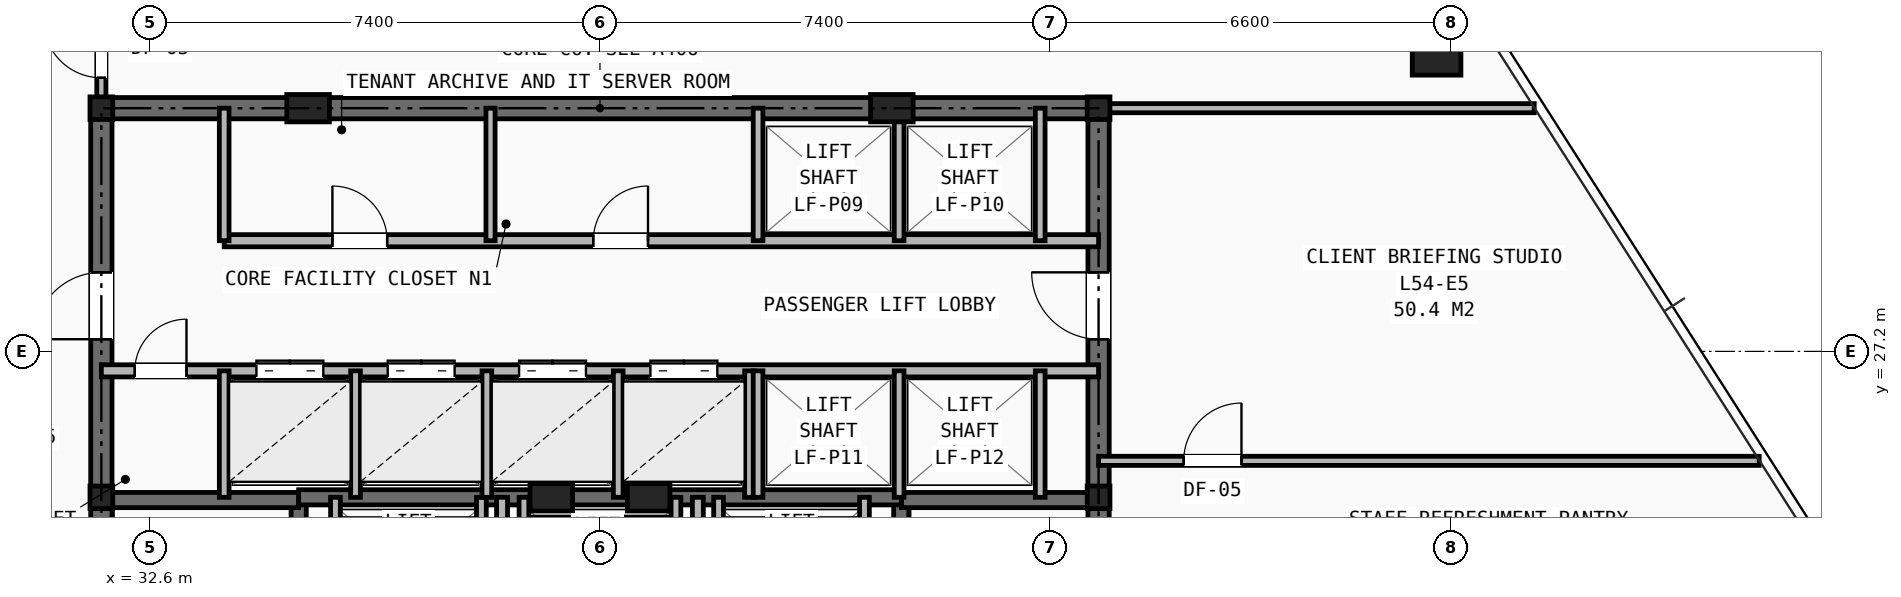
"""IFC4 building model, lengths in metres.
Left out: names, types, materials, properties, quantities, classifications, styles, units other than length and angle.
Written with IfcOpenShell. Run it as: python <this file> out.ifc"""

import sys

from ifc_helpers import new_model, si_unit, direction, frame, frame_2d, origin, origin_2d, place, context, subcontext, project, spatial, rectangle, hollow_rectangle, i_section, extrude, element, fill, save


model = new_model("IFC4")
c1 = context("Model", 3, precision=1e-05, world=origin(), true_north=direction((0.0, 1.0)))
c2 = subcontext(c1, "Body", "Model", "MODEL_VIEW")
j1 = project(units=[si_unit("LENGTHUNIT", "METRE"), si_unit("PLANEANGLEUNIT", "RADIAN")], contexts=[c1])
p1 = place(None, origin())
s1 = spatial("IfcSite", under=j1, at=p1, CompositionType="ELEMENT")
p2 = place(p1, origin())
s2 = spatial("IfcBuilding", under=s1, at=p2, CompositionType="ELEMENT")
p3 = place(p2, frame((0.0, 0.0, 189.6)))
s3 = spatial("IfcBuildingStorey", under=s2, at=p3, CompositionType="ELEMENT", Elevation=189.6)
for number, where, z_axis, x_axis in (
    (1, (31.8, 24.8, 0.0), (0.0, 0.0, 1.0), (1.0, 0.0, 0.0)),
    (2, (48.2, 24.8, 0.0), (0.0, 0.0, 1.0), (1.0, 0.0, 0.0)),
    (3, (31.8, 31.2, 0.0), (0.0, 0.0, 1.0), (1.0, 0.0, 0.0)),
    (4, (48.2, 31.2, 0.0), (0.0, 0.0, 1.0), (1.0, 0.0, 0.0)),
):
    element("IfcColumn", number, at=place(p3, frame(where, z_axis=z_axis, x_axis=x_axis)), inside=s3, PredefinedType="COLUMN", context=c2, shape_type="SweptSolid", body=[
        extrude(i_section(OverallWidth=0.374, OverallDepth=0.372, WebThickness=0.016, FlangeThickness=0.026, at=origin_2d()), origin(), (0.0, 0.0, 1.0), 3.45),
    ])
for number, where, z_axis, x_axis in (
    (5, (35.2, 31.2, 0.0), (0.0, 0.0, 1.0), (1.0, 0.0, 0.0)),
    (6, (44.8, 31.2, 0.0), (0.0, 0.0, 1.0), (1.0, 0.0, 0.0)),
    (7, (39.2, 24.8, 0.0), (0.0, 0.0, 1.0), (1.0, 0.0, 0.0)),
    (8, (40.8, 24.8, 0.0), (0.0, 0.0, 1.0), (1.0, 0.0, 0.0)),
):
    element("IfcColumn", number, at=place(p3, frame(where, z_axis=z_axis, x_axis=x_axis)), inside=s3, PredefinedType="PILASTER", context=c2, shape_type="SweptSolid", body=[
        extrude(rectangle(XDim=0.7, YDim=0.45, at=origin_2d()), origin(), (0.0, 0.0, 1.0), 3.45),
    ])
p4 = place(p3, frame((53.759, 32.144, 0.0), z_axis=(0.0, 0.0, 1.0), x_axis=(1.0, 0.0, 0.0)))
e9 = element("IfcColumn", 9, at=p4, inside=s3, PredefinedType="COLUMN", context=c2, shape_type="SweptSolid", body=[
    extrude(hollow_rectangle(XDim=0.8, YDim=0.8, WallThickness=0.055, at=origin_2d()), origin(), (0.0, 0.0, 1.0), 3.45),
])
p5 = place(p3, frame((31.8, 31.2, 0.0), z_axis=(0.0, 0.0, 1.0), x_axis=(1.0, 0.0, 0.0)))
e10 = element("IfcWall", 10, at=p5, inside=s3, PredefinedType="SHEAR", context=c2, shape_type="SweptSolid", body=[
    extrude(rectangle(XDim=16.4, YDim=0.35, at=frame_2d((8.2, 0.0))), origin(), (0.0, 0.0, 1.0), 3.21),
])
p6 = place(p3, frame((31.8, 16.4, 0.0), z_axis=(0.0, 0.0, 1.0), x_axis=(0.0, 1.0, 0.0)))
e11 = element("IfcWall", 11, at=p6, inside=s3, PredefinedType="SHEAR", context=c2, shape_type="SweptSolid", body=[
    extrude(rectangle(XDim=14.8, YDim=0.35, at=frame_2d((7.4, 0.0))), origin(), (0.0, 0.0, 1.0), 3.21),
])
p7 = place(p6, frame((11.0, 0.0, 0.0)))
e12 = element("IfcOpeningElement", 12, at=p7, cuts=e11, PredefinedType="OPENING", context=c2, shape_type="SweptSolid", body=[
    extrude(rectangle(XDim=1.1, YDim=2.15, at=frame_2d((0.55, 1.075))), frame((0.0, 0.185, 0.0), z_axis=(0.0, -1.0, 0.0), x_axis=(1.0, 0.0, 0.0)), (0.0, 0.0, 1.0), 0.37),
])
p8 = place(p3, frame((48.2, 16.4, 0.0), z_axis=(0.0, 0.0, 1.0), x_axis=(0.0, 1.0, 0.0)))
e13 = element("IfcWall", 13, at=p8, inside=s3, PredefinedType="SHEAR", context=c2, shape_type="SweptSolid", body=[
    extrude(rectangle(XDim=14.8, YDim=0.35, at=frame_2d((7.4, 0.0))), origin(), (0.0, 0.0, 1.0), 3.21),
])
p9 = place(p8, frame((11.0, 0.0, 0.0)))
e14 = element("IfcOpeningElement", 14, at=p9, cuts=e13, PredefinedType="OPENING", context=c2, shape_type="SweptSolid", body=[
    extrude(rectangle(XDim=1.1, YDim=2.15, at=frame_2d((0.55, 1.075))), frame((0.0, 0.185, 0.0), z_axis=(0.0, -1.0, 0.0), x_axis=(1.0, 0.0, 0.0)), (0.0, 0.0, 1.0), 0.37),
])
p10 = place(p3, frame((35.045, 16.4, 0.0), z_axis=(0.0, 0.0, 1.0), x_axis=(0.0, 1.0, 0.0)))
e15 = element("IfcWall", 15, at=p10, inside=s3, PredefinedType="SHEAR", context=c2, shape_type="SweptSolid", body=[
    extrude(rectangle(XDim=8.4, YDim=0.25, at=frame_2d((4.2, 0.0))), origin(), (0.0, 0.0, 1.0), 3.21),
])
p11 = place(p10, frame((0.45, 0.0, 0.0)))
e16 = element("IfcOpeningElement", 16, at=p11, cuts=e15, PredefinedType="OPENING", context=c2, shape_type="SweptSolid", body=[
    extrude(rectangle(XDim=0.95, YDim=2.1, at=frame_2d((0.475, 1.05))), frame((0.0, 0.135, 0.0), z_axis=(0.0, -1.0, 0.0), x_axis=(1.0, 0.0, 0.0)), (0.0, 0.0, 1.0), 0.27),
])
p12 = place(p3, frame((31.8, 24.755, 0.0), z_axis=(0.0, 0.0, 1.0), x_axis=(1.0, 0.0, 0.0)))
e17 = element("IfcWall", 17, at=p12, inside=s3, PredefinedType="SHEAR", context=c2, shape_type="SweptSolid", body=[
    extrude(rectangle(XDim=3.245, YDim=0.25, at=frame_2d((1.623, 0.0))), origin(), (0.0, 0.0, 1.0), 3.21),
])
p13 = place(p3, frame((44.955, 16.4, 0.0), z_axis=(0.0, 0.0, 1.0), x_axis=(0.0, 1.0, 0.0)))
e18 = element("IfcWall", 18, at=p13, inside=s3, PredefinedType="SHEAR", context=c2, shape_type="SweptSolid", body=[
    extrude(rectangle(XDim=8.4, YDim=0.25, at=frame_2d((4.2, 0.0))), origin(), (0.0, 0.0, 1.0), 3.21),
])
p14 = place(p13, frame((0.45, 0.0, 0.0)))
e19 = element("IfcOpeningElement", 19, at=p14, cuts=e18, PredefinedType="OPENING", context=c2, shape_type="SweptSolid", body=[
    extrude(rectangle(XDim=0.95, YDim=2.1, at=frame_2d((0.475, 1.05))), frame((0.0, 0.135, 0.0), z_axis=(0.0, -1.0, 0.0), x_axis=(1.0, 0.0, 0.0)), (0.0, 0.0, 1.0), 0.27),
])
p15 = place(p3, frame((44.955, 24.755, 0.0), z_axis=(0.0, 0.0, 1.0), x_axis=(1.0, 0.0, 0.0)))
e20 = element("IfcWall", 20, at=p15, inside=s3, PredefinedType="SHEAR", context=c2, shape_type="SweptSolid", body=[
    extrude(rectangle(XDim=3.245, YDim=0.25, at=frame_2d((1.623, 0.0))), origin(), (0.0, 0.0, 1.0), 3.21),
])
p16 = place(p3, frame((35.045, 24.8, 0.0), z_axis=(0.0, 0.0, 1.0), x_axis=(1.0, 0.0, 0.0)))
e21 = element("IfcWall", 21, at=p16, inside=s3, PredefinedType="SHEAR", context=c2, shape_type="SweptSolid", body=[
    extrude(rectangle(XDim=9.91, YDim=0.25, at=frame_2d((4.955, 0.0))), origin(), (0.0, 0.0, 1.0), 3.21),
])
p17 = place(p3, frame((38.39, 16.4, 0.0), z_axis=(0.0, 0.0, 1.0), x_axis=(0.0, 1.0, 0.0)))
e22 = element("IfcWall", 22, at=p17, inside=s3, PredefinedType="PARTITIONING", context=c2, shape_type="SweptSolid", body=[
    extrude(rectangle(XDim=8.4, YDim=0.18, at=frame_2d((4.2, 0.0))), origin(), (0.0, 0.0, 1.0), 2.665),
])
p18 = place(p17, frame((3.85, 0.0, 0.0)))
e23 = element("IfcOpeningElement", 23, at=p18, cuts=e22, PredefinedType="OPENING", context=c2, shape_type="SweptSolid", body=[
    extrude(rectangle(XDim=0.95, YDim=2.1, at=frame_2d((0.475, 1.05))), frame((0.0, 0.1, 0.0), z_axis=(0.0, -1.0, 0.0), x_axis=(1.0, 0.0, 0.0)), (0.0, 0.0, 1.0), 0.2),
])
p19 = place(p3, frame((41.61, 16.4, 0.0), z_axis=(0.0, 0.0, 1.0), x_axis=(0.0, 1.0, 0.0)))
e24 = element("IfcWall", 24, at=p19, inside=s3, PredefinedType="PARTITIONING", context=c2, shape_type="SweptSolid", body=[
    extrude(rectangle(XDim=8.4, YDim=0.18, at=frame_2d((4.2, 0.0))), origin(), (0.0, 0.0, 1.0), 2.665),
])
for number, where, z_axis, x_axis in (
    (25, (35.65, 22.48, 0.0), (0.0, 0.0, 1.0), (0.0, 1.0, 0.0)),
    (26, (38.05, 22.48, 0.0), (0.0, 0.0, 1.0), (0.0, 1.0, 0.0)),
    (27, (41.95, 22.48, 0.0), (0.0, 0.0, 1.0), (0.0, 1.0, 0.0)),
    (28, (44.35, 22.48, 0.0), (0.0, 0.0, 1.0), (0.0, 1.0, 0.0)),
    (29, (38.75, 22.48, 0.0), (0.0, 0.0, 1.0), (0.0, 1.0, 0.0)),
    (30, (41.25, 22.48, 0.0), (0.0, 0.0, 1.0), (0.0, 1.0, 0.0)),
):
    element("IfcWall", number, at=place(p3, frame(where, z_axis=z_axis, x_axis=x_axis)), inside=s3, PredefinedType="SOLIDWALL", context=c2, shape_type="SweptSolid", body=[
        extrude(rectangle(XDim=2.32, YDim=0.16, at=frame_2d((1.16, 0.0))), origin(), (0.0, 0.0, 1.0), 3.21),
    ])
p20 = place(p3, frame((33.82, 29.02, 0.0), z_axis=(0.0, 0.0, 1.0), x_axis=(1.0, 0.0, 0.0)))
e31 = element("IfcWall", 31, at=p20, inside=s3, PredefinedType="SOLIDWALL", context=c2, shape_type="SweptSolid", body=[
    extrude(rectangle(XDim=14.38, YDim=0.2, at=frame_2d((7.19, 0.0))), origin(), (0.0, 0.0, 1.0), 2.665),
])
p21 = place(p20, frame((1.78, 0.0, 0.0)))
e32 = element("IfcOpeningElement", 32, at=p21, cuts=e31, PredefinedType="OPENING", context=c2, shape_type="SweptSolid", body=[
    extrude(rectangle(XDim=0.9, YDim=2.1, at=frame_2d((0.45, 1.05))), frame((0.0, 0.11, 0.0), z_axis=(0.0, -1.0, 0.0), x_axis=(1.0, 0.0, 0.0)), (0.0, 0.0, 1.0), 0.22),
])
p22 = place(p20, frame((6.07, 0.0, 0.0)))
e33 = element("IfcOpeningElement", 33, at=p22, cuts=e31, PredefinedType="OPENING", context=c2, shape_type="SweptSolid", body=[
    extrude(rectangle(XDim=0.9, YDim=2.1, at=frame_2d((0.45, 1.05))), frame((0.0, 0.11, 0.0), z_axis=(0.0, -1.0, 0.0), x_axis=(1.0, 0.0, 0.0)), (0.0, 0.0, 1.0), 0.22),
])
p23 = place(p3, frame((31.8, 26.88, 0.0), z_axis=(0.0, 0.0, 1.0), x_axis=(1.0, 0.0, 0.0)))
e34 = element("IfcWall", 34, at=p23, inside=s3, PredefinedType="SOLIDWALL", context=c2, shape_type="SweptSolid", body=[
    extrude(rectangle(XDim=16.4, YDim=0.2, at=frame_2d((8.2, 0.0))), origin(), (0.0, 0.0, 1.0), 2.665),
])
p24 = place(p23, frame((0.55, 0.0, 0.0)))
e35 = element("IfcOpeningElement", 35, at=p24, cuts=e34, PredefinedType="OPENING", context=c2, shape_type="SweptSolid", body=[
    extrude(rectangle(XDim=0.85, YDim=2.05, at=frame_2d((0.425, 1.025))), frame((0.0, 0.11, 0.0), z_axis=(0.0, -1.0, 0.0), x_axis=(1.0, 0.0, 0.0)), (0.0, 0.0, 1.0), 0.22),
])
p25 = place(p23, frame((2.55, 0.0, 0.0)))
e36 = element("IfcOpeningElement", 36, at=p25, cuts=e34, PredefinedType="OPENING", context=c2, shape_type="SweptSolid", body=[
    extrude(rectangle(XDim=1.1, YDim=2.15, at=frame_2d((0.55, 1.075))), frame((0.0, 0.11, 0.0), z_axis=(0.0, -1.0, 0.0), x_axis=(1.0, 0.0, 0.0)), (0.0, 0.0, 1.0), 0.22),
])
p26 = place(p23, frame((4.71, 0.0, 0.0)))
e37 = element("IfcOpeningElement", 37, at=p26, cuts=e34, PredefinedType="OPENING", context=c2, shape_type="SweptSolid", body=[
    extrude(rectangle(XDim=1.1, YDim=2.15, at=frame_2d((0.55, 1.075))), frame((0.0, 0.11, 0.0), z_axis=(0.0, -1.0, 0.0), x_axis=(1.0, 0.0, 0.0)), (0.0, 0.0, 1.0), 0.22),
])
p27 = place(p23, frame((6.87, 0.0, 0.0)))
e38 = element("IfcOpeningElement", 38, at=p27, cuts=e34, PredefinedType="OPENING", context=c2, shape_type="SweptSolid", body=[
    extrude(rectangle(XDim=1.1, YDim=2.15, at=frame_2d((0.55, 1.075))), frame((0.0, 0.11, 0.0), z_axis=(0.0, -1.0, 0.0), x_axis=(1.0, 0.0, 0.0)), (0.0, 0.0, 1.0), 0.22),
])
p28 = place(p23, frame((9.03, 0.0, 0.0)))
e39 = element("IfcOpeningElement", 39, at=p28, cuts=e34, PredefinedType="OPENING", context=c2, shape_type="SweptSolid", body=[
    extrude(rectangle(XDim=1.1, YDim=2.15, at=frame_2d((0.55, 1.075))), frame((0.0, 0.11, 0.0), z_axis=(0.0, -1.0, 0.0), x_axis=(1.0, 0.0, 0.0)), (0.0, 0.0, 1.0), 0.22),
])
p29 = place(p3, frame((33.82, 29.02, 0.0), z_axis=(0.0, 0.0, 1.0), x_axis=(0.0, 1.0, 0.0)))
e40 = element("IfcWall", 40, at=p29, inside=s3, PredefinedType="SOLIDWALL", context=c2, shape_type="SweptSolid", body=[
    extrude(rectangle(XDim=2.18, YDim=0.16, at=frame_2d((1.09, 0.0))), origin(), (0.0, 0.0, 1.0), 2.665),
])
p30 = place(p3, frame((33.82, 24.8, 0.0), z_axis=(0.0, 0.0, 1.0), x_axis=(0.0, 1.0, 0.0)))
e41 = element("IfcWall", 41, at=p30, inside=s3, PredefinedType="SOLIDWALL", context=c2, shape_type="SweptSolid", body=[
    extrude(rectangle(XDim=2.08, YDim=0.16, at=frame_2d((1.04, 0.0))), origin(), (0.0, 0.0, 1.0), 3.21),
])
p31 = place(p3, frame((38.2, 29.02, 0.0), z_axis=(0.0, 0.0, 1.0), x_axis=(0.0, 1.0, 0.0)))
e42 = element("IfcWall", 42, at=p31, inside=s3, PredefinedType="PARTITIONING", context=c2, shape_type="SweptSolid", body=[
    extrude(rectangle(XDim=2.18, YDim=0.15, at=frame_2d((1.09, 0.0))), origin(), (0.0, 0.0, 1.0), 2.665),
])
for number, where, z_axis, x_axis in (
    (43, (35.98, 24.8, 0.0), (0.0, 0.0, 1.0), (0.0, 1.0, 0.0)),
    (44, (38.14, 24.8, 0.0), (0.0, 0.0, 1.0), (0.0, 1.0, 0.0)),
    (45, (40.3, 24.8, 0.0), (0.0, 0.0, 1.0), (0.0, 1.0, 0.0)),
    (46, (42.46, 24.8, 0.0), (0.0, 0.0, 1.0), (0.0, 1.0, 0.0)),
):
    element("IfcWall", number, at=place(p3, frame(where, z_axis=z_axis, x_axis=x_axis)), inside=s3, PredefinedType="SOLIDWALL", context=c2, shape_type="SweptSolid", body=[
        extrude(rectangle(XDim=2.08, YDim=0.16, at=frame_2d((1.04, 0.0))), origin(), (0.0, 0.0, 1.0), 3.21),
    ])
for number, where, z_axis, x_axis in (
    (47, (42.6, 29.02, 0.0), (0.0, 0.0, 1.0), (0.0, 1.0, 0.0)),
    (48, (44.92, 29.02, 0.0), (0.0, 0.0, 1.0), (0.0, 1.0, 0.0)),
    (49, (47.24, 29.02, 0.0), (0.0, 0.0, 1.0), (0.0, 1.0, 0.0)),
):
    element("IfcWall", number, at=place(p3, frame(where, z_axis=z_axis, x_axis=x_axis)), inside=s3, PredefinedType="SOLIDWALL", context=c2, shape_type="SweptSolid", body=[
        extrude(rectangle(XDim=2.18, YDim=0.16, at=frame_2d((1.09, 0.0))), origin(), (0.0, 0.0, 1.0), 2.665),
    ])
for number, where, z_axis, x_axis in (
    (50, (42.6, 24.8, 0.0), (0.0, 0.0, 1.0), (0.0, 1.0, 0.0)),
    (51, (44.92, 24.8, 0.0), (0.0, 0.0, 1.0), (0.0, 1.0, 0.0)),
    (52, (47.24, 24.8, 0.0), (0.0, 0.0, 1.0), (0.0, 1.0, 0.0)),
):
    element("IfcWall", number, at=place(p3, frame(where, z_axis=z_axis, x_axis=x_axis)), inside=s3, PredefinedType="SOLIDWALL", context=c2, shape_type="SweptSolid", body=[
        extrude(rectangle(XDim=2.08, YDim=0.16, at=frame_2d((1.04, 0.0))), origin(), (0.0, 0.0, 1.0), 3.21),
    ])
p32 = place(p3, frame((31.8, 31.2, 0.0), z_axis=(0.0, 0.0, 1.0), x_axis=(0.0, 1.0, 0.0)))
e53 = element("IfcWall", 53, at=p32, inside=s3, PredefinedType="PARTITIONING", context=c2, shape_type="SweptSolid", body=[
    extrude(rectangle(XDim=5.3, YDim=0.15, at=frame_2d((2.65, 0.0))), origin(), (0.0, 0.0, 1.0), 2.225),
])
p33 = place(p32, frame((0.5, 0.0, 0.0)))
e54 = element("IfcOpeningElement", 54, at=p33, cuts=e53, PredefinedType="OPENING", context=c2, shape_type="SweptSolid", body=[
    extrude(rectangle(XDim=0.95, YDim=2.1, at=frame_2d((0.475, 1.05))), frame((0.0, 0.085, 0.0), z_axis=(0.0, -1.0, 0.0), x_axis=(1.0, 0.0, 0.0)), (0.0, 0.0, 1.0), 0.17),
])
p34 = place(p3, frame((48.2, 31.2, 0.0), z_axis=(0.0, 0.0, 1.0), x_axis=(1.0, 0.0, 0.0)))
e55 = element("IfcWall", 55, at=p34, inside=s3, PredefinedType="PARTITIONING", context=c2, shape_type="SweptSolid", body=[
    extrude(rectangle(XDim=7.165, YDim=0.15, at=frame_2d((3.582, 0.0))), origin(), (0.0, 0.0, 1.0), 2.225),
])
p35 = place(p3, frame((48.2, 25.4, 0.0), z_axis=(0.0, 0.0, 1.0), x_axis=(1.0, 0.0, 0.0)))
e56 = element("IfcWall", 56, at=p35, inside=s3, PredefinedType="PARTITIONING", context=c2, shape_type="SweptSolid", body=[
    extrude(rectangle(XDim=10.865, YDim=0.15, at=frame_2d((5.433, 0.0))), origin(), (0.0, 0.0, 1.0), 2.589),
])
p36 = place(p35, frame((1.4, 0.0, 0.0)))
e57 = element("IfcOpeningElement", 57, at=p36, cuts=e56, PredefinedType="OPENING", context=c2, shape_type="SweptSolid", body=[
    extrude(rectangle(XDim=0.95, YDim=2.1, at=frame_2d((0.475, 1.05))), frame((0.0, 0.085, 0.0), z_axis=(0.0, -1.0, 0.0), x_axis=(1.0, 0.0, 0.0)), (0.0, 0.0, 1.0), 0.17),
])
p37 = place(p24, origin())
e58 = element("IfcDoor", 58, at=p37, inside=s3, OperationType="SINGLE_SWING_RIGHT", PredefinedType="DOOR", context=c2, shape_type="SweptSolid", body=[
    extrude(rectangle(XDim=0.85, YDim=2.05, at=frame_2d((0.425, 1.025))), frame((0.0, 0.025, 0.0), z_axis=(0.0, -1.0, 0.0), x_axis=(1.0, 0.0, 0.0)), (0.0, 0.0, 1.0), 0.05),
])
fill(e35, e58)
p38 = place(p7, origin())
e59 = element("IfcDoor", 59, at=p38, inside=s3, OperationType="SINGLE_SWING_LEFT", PredefinedType="DOOR", context=c2, shape_type="SweptSolid", body=[
    extrude(rectangle(XDim=1.1, YDim=2.15, at=frame_2d((0.55, 1.075))), frame((0.0, 0.025, 0.0), z_axis=(0.0, -1.0, 0.0), x_axis=(1.0, 0.0, 0.0)), (0.0, 0.0, 1.0), 0.05),
])
fill(e12, e59)
p39 = place(p9, origin())
e60 = element("IfcDoor", 60, at=p39, inside=s3, OperationType="SINGLE_SWING_RIGHT", PredefinedType="DOOR", context=c2, shape_type="SweptSolid", body=[
    extrude(rectangle(XDim=1.1, YDim=2.15, at=frame_2d((0.55, 1.075))), frame((0.0, 0.025, 0.0), z_axis=(0.0, -1.0, 0.0), x_axis=(1.0, 0.0, 0.0)), (0.0, 0.0, 1.0), 0.05),
])
fill(e14, e60)
p40 = place(p21, origin())
e61 = element("IfcDoor", 61, at=p40, inside=s3, OperationType="SINGLE_SWING_LEFT", PredefinedType="DOOR", context=c2, shape_type="SweptSolid", body=[
    extrude(rectangle(XDim=0.9, YDim=2.1, at=frame_2d((0.45, 1.05))), frame((0.0, 0.025, 0.0), z_axis=(0.0, -1.0, 0.0), x_axis=(1.0, 0.0, 0.0)), (0.0, 0.0, 1.0), 0.05),
])
fill(e32, e61)
p41 = place(p22, origin())
e62 = element("IfcDoor", 62, at=p41, inside=s3, OperationType="SINGLE_SWING_RIGHT", PredefinedType="DOOR", context=c2, shape_type="SweptSolid", body=[
    extrude(rectangle(XDim=0.9, YDim=2.1, at=frame_2d((0.45, 1.05))), frame((0.0, 0.025, 0.0), z_axis=(0.0, -1.0, 0.0), x_axis=(1.0, 0.0, 0.0)), (0.0, 0.0, 1.0), 0.05),
])
fill(e33, e62)
p42 = place(p25, origin())
e63 = element("IfcDoor", 63, at=p42, inside=s3, OperationType="DOUBLE_DOOR_SLIDING", PredefinedType="DOOR", context=c2, shape_type="SweptSolid", body=[
    extrude(rectangle(XDim=1.1, YDim=2.15, at=frame_2d((0.55, 1.075))), frame((0.0, 0.025, 0.0), z_axis=(0.0, -1.0, 0.0), x_axis=(1.0, 0.0, 0.0)), (0.0, 0.0, 1.0), 0.05),
])
fill(e36, e63)
p43 = place(p26, origin())
e64 = element("IfcDoor", 64, at=p43, inside=s3, OperationType="DOUBLE_DOOR_SLIDING", PredefinedType="DOOR", context=c2, shape_type="SweptSolid", body=[
    extrude(rectangle(XDim=1.1, YDim=2.15, at=frame_2d((0.55, 1.075))), frame((0.0, 0.025, 0.0), z_axis=(0.0, -1.0, 0.0), x_axis=(1.0, 0.0, 0.0)), (0.0, 0.0, 1.0), 0.05),
])
fill(e37, e64)
p44 = place(p27, origin())
e65 = element("IfcDoor", 65, at=p44, inside=s3, OperationType="DOUBLE_DOOR_SLIDING", PredefinedType="DOOR", context=c2, shape_type="SweptSolid", body=[
    extrude(rectangle(XDim=1.1, YDim=2.15, at=frame_2d((0.55, 1.075))), frame((0.0, 0.025, 0.0), z_axis=(0.0, -1.0, 0.0), x_axis=(1.0, 0.0, 0.0)), (0.0, 0.0, 1.0), 0.05),
])
fill(e38, e65)
p45 = place(p28, origin())
e66 = element("IfcDoor", 66, at=p45, inside=s3, OperationType="DOUBLE_DOOR_SLIDING", PredefinedType="DOOR", context=c2, shape_type="SweptSolid", body=[
    extrude(rectangle(XDim=1.1, YDim=2.15, at=frame_2d((0.55, 1.075))), frame((0.0, 0.025, 0.0), z_axis=(0.0, -1.0, 0.0), x_axis=(1.0, 0.0, 0.0)), (0.0, 0.0, 1.0), 0.05),
])
fill(e39, e66)
p46 = place(p33, origin())
e67 = element("IfcDoor", 67, at=p46, inside=s3, OperationType="SINGLE_SWING_RIGHT", PredefinedType="DOOR", context=c2, shape_type="SweptSolid", body=[
    extrude(rectangle(XDim=0.95, YDim=2.1, at=frame_2d((0.475, 1.05))), frame((0.0, 0.025, 0.0), z_axis=(0.0, -1.0, 0.0), x_axis=(1.0, 0.0, 0.0)), (0.0, 0.0, 1.0), 0.05),
])
fill(e54, e67)
p47 = place(p36, origin())
e68 = element("IfcDoor", 68, at=p47, inside=s3, OperationType="SINGLE_SWING_RIGHT", PredefinedType="DOOR", context=c2, shape_type="SweptSolid", body=[
    extrude(rectangle(XDim=0.95, YDim=2.1, at=frame_2d((0.475, 1.05))), frame((0.0, 0.025, 0.0), z_axis=(0.0, -1.0, 0.0), x_axis=(1.0, 0.0, 0.0)), (0.0, 0.0, 1.0), 0.05),
])
fill(e57, e68)
save(model, sys.argv[1])
